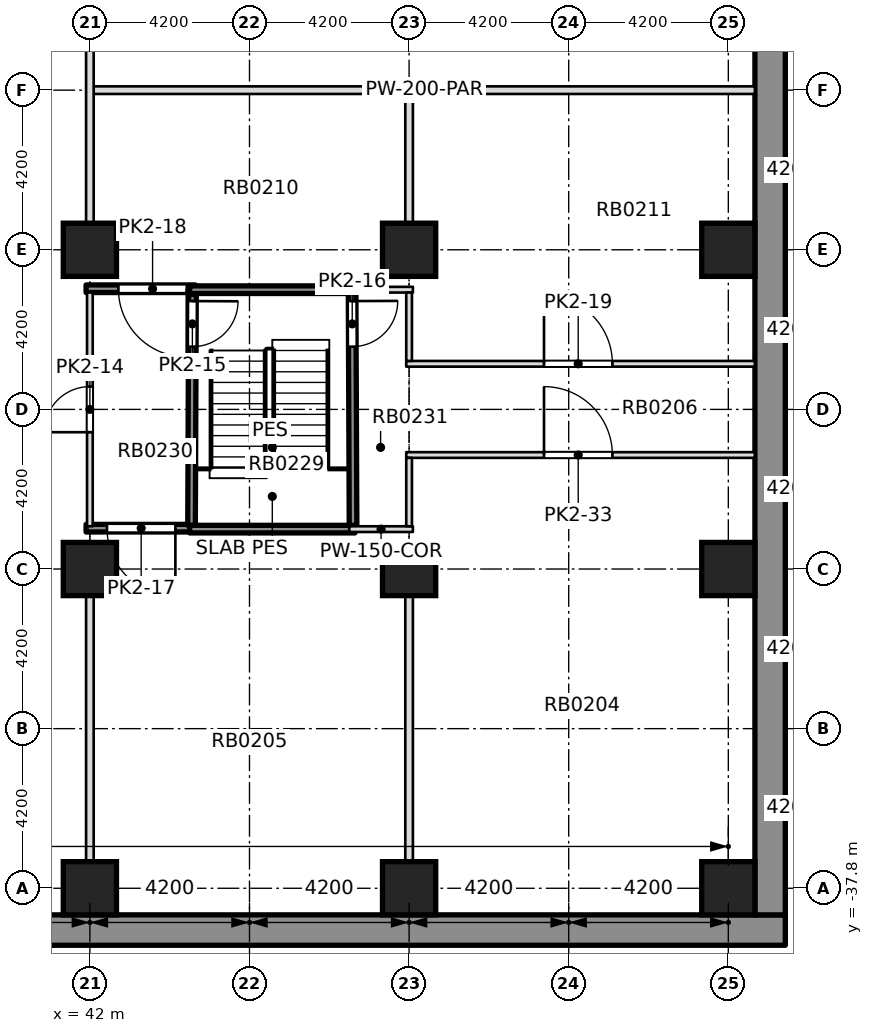
"""IFC4 building model, lengths in metres.
Left out: names, types, materials, properties, quantities, classifications, styles, units other than length and angle.
Written with IfcOpenShell. Run it as: python <this file> out.ifc"""

import sys

from ifc_helpers import new_model, si_unit, direction, frame, frame_2d, origin, origin_2d, place, context, subcontext, project, spatial, rectangle, extrude, element, fill, save


model = new_model("IFC4")
c1 = context("Model", 3, precision=1e-05, world=origin(), true_north=direction((0.0, 1.0)))
c2 = subcontext(c1, "Body", "Model", "MODEL_VIEW")
j1 = project(units=[si_unit("LENGTHUNIT", "METRE"), si_unit("PLANEANGLEUNIT", "RADIAN")], contexts=[c1])
p1 = place(None, origin())
s1 = spatial("IfcSite", under=j1, at=p1, CompositionType="ELEMENT")
p2 = place(p1, origin())
s2 = spatial("IfcBuilding", under=s1, at=p2, CompositionType="ELEMENT")
p3 = place(p2, frame((0.0, 0.0, -8.4)))
s3 = spatial("IfcBuildingStorey", under=s2, at=p3, CompositionType="ELEMENT", Elevation=-8.4)
p4 = place(p3, frame((-43.5, -38.9, -0.5), z_axis=(0.0, 0.0, 1.0), x_axis=(1.0, 0.0, 0.0)))
e1 = element("IfcWall", 1, at=p4, inside=s3, PredefinedType="SOLIDWALL", context=c2, shape_type="SweptSolid", body=[
    extrude(rectangle(XDim=103.8, YDim=0.8, at=frame_2d((51.9, 0.0))), origin(), (0.0, 0.0, 1.0), 4.7),
])
p5 = place(p3, frame((59.9, -38.5, -0.5), z_axis=(0.0, 0.0, 1.0), x_axis=(0.0, 1.0, 0.0)))
e2 = element("IfcWall", 2, at=p5, inside=s3, PredefinedType="SOLIDWALL", context=c2, shape_type="SweptSolid", body=[
    extrude(rectangle(XDim=77.0, YDim=0.8, at=frame_2d((38.5, 0.0))), origin(), (0.0, 0.0, 1.0), 4.7),
])
for number, where, z_axis, x_axis in (
    (3, (42.0, -37.8, -0.5), (0.0, 0.0, 1.0), (1.0, 0.0, 0.0)),
    (4, (50.4, -37.8, -0.5), (0.0, 0.0, 1.0), (1.0, 0.0, 0.0)),
    (5, (58.8, -37.8, -0.5), (0.0, 0.0, 1.0), (1.0, 0.0, 0.0)),
    (6, (42.0, -29.4, -0.5), (0.0, 0.0, 1.0), (1.0, 0.0, 0.0)),
    (7, (50.4, -29.4, -0.5), (0.0, 0.0, 1.0), (1.0, 0.0, 0.0)),
    (8, (58.8, -29.4, -0.5), (0.0, 0.0, 1.0), (1.0, 0.0, 0.0)),
    (9, (42.0, -21.0, -0.5), (0.0, 0.0, 1.0), (1.0, 0.0, 0.0)),
    (10, (50.4, -21.0, -0.5), (0.0, 0.0, 1.0), (1.0, 0.0, 0.0)),
    (11, (58.8, -21.0, -0.5), (0.0, 0.0, 1.0), (1.0, 0.0, 0.0)),
):
    element("IfcColumn", number, at=place(p3, frame(where, z_axis=z_axis, x_axis=x_axis)), inside=s3, PredefinedType="COLUMN", context=c2, shape_type="SweptSolid", body=[
        extrude(rectangle(XDim=1.4, YDim=1.4, at=origin_2d()), origin(), (0.0, 0.0, 1.0), 4.7),
    ])
p6 = place(p3, frame((41.9, -28.325, 0.0), z_axis=(0.0, 0.0, 1.0), x_axis=(1.0, 0.0, 0.0)))
e12 = element("IfcWall", 12, at=p6, inside=s3, PredefinedType="SOLIDWALL", context=c2, shape_type="SweptSolid", body=[
    extrude(rectangle(XDim=2.875, YDim=0.2, at=frame_2d((1.438, 0.0))), origin(), (0.0, 0.0, 1.0), 3.85),
])
p7 = place(p6, frame((0.55, 0.0, 0.0)))
e13 = element("IfcOpeningElement", 13, at=p7, cuts=e12, PredefinedType="OPENING", context=c2, shape_type="SweptSolid", body=[
    extrude(rectangle(XDim=1.8, YDim=2.1, at=frame_2d((0.9, 1.05))), frame((0.0, 0.11, 0.0), z_axis=(0.0, -1.0, 0.0), x_axis=(1.0, 0.0, 0.0)), (0.0, 0.0, 1.0), 0.22),
])
p8 = place(p3, frame((44.625, -28.35, 0.0), z_axis=(0.0, 0.0, 1.0), x_axis=(1.0, 0.0, 0.0)))
e14 = element("IfcWall", 14, at=p8, inside=s3, PredefinedType="SOLIDWALL", context=c2, shape_type="SweptSolid", body=[
    extrude(rectangle(XDim=4.35, YDim=0.2, at=frame_2d((2.175, 0.0))), origin(), (0.0, 0.0, 1.0), 3.85),
])
p9 = place(p3, frame((48.825, -28.35, 0.0), z_axis=(0.0, 0.0, 1.0), x_axis=(1.0, 0.0, 0.0)))
e15 = element("IfcWall", 15, at=p9, inside=s3, PredefinedType="PARTITIONING", context=c2, shape_type="SweptSolid", body=[
    extrude(rectangle(XDim=1.675, YDim=0.15, at=frame_2d((0.837, 0.0))), origin(), (0.0, 0.0, 1.0), 3.85),
])
p10 = place(p3, frame((50.325, -26.4, 0.0), z_axis=(0.0, 0.0, 1.0), x_axis=(1.0, 0.0, 0.0)))
e16 = element("IfcWall", 16, at=p10, inside=s3, PredefinedType="PARTITIONING", context=c2, shape_type="SweptSolid", body=[
    extrude(rectangle(XDim=9.174, YDim=0.15, at=frame_2d((4.587, 0.0))), origin(), (0.0, 0.0, 1.0), 3.85),
])
p11 = place(p10, frame((3.625, 0.0, 0.0)))
e17 = element("IfcOpeningElement", 17, at=p11, cuts=e16, PredefinedType="OPENING", context=c2, shape_type="SweptSolid", body=[
    extrude(rectangle(XDim=1.8, YDim=2.1, at=frame_2d((0.9, 1.05))), frame((0.0, 0.085, 0.0), z_axis=(0.0, -1.0, 0.0), x_axis=(1.0, 0.0, 0.0)), (0.0, 0.0, 1.0), 0.17),
])
p12 = place(p3, frame((50.325, -24.0, 0.0), z_axis=(0.0, 0.0, 1.0), x_axis=(1.0, 0.0, 0.0)))
e18 = element("IfcWall", 18, at=p12, inside=s3, PredefinedType="PARTITIONING", context=c2, shape_type="SweptSolid", body=[
    extrude(rectangle(XDim=9.174, YDim=0.15, at=frame_2d((4.587, 0.0))), origin(), (0.0, 0.0, 1.0), 3.85),
])
p13 = place(p12, frame((3.625, 0.0, 0.0)))
e19 = element("IfcOpeningElement", 19, at=p13, cuts=e18, PredefinedType="OPENING", context=c2, shape_type="SweptSolid", body=[
    extrude(rectangle(XDim=1.8, YDim=2.1, at=frame_2d((0.9, 1.05))), frame((0.0, 0.085, 0.0), z_axis=(0.0, -1.0, 0.0), x_axis=(1.0, 0.0, 0.0)), (0.0, 0.0, 1.0), 0.17),
])
p14 = place(p3, frame((41.9, -22.025, 0.0), z_axis=(0.0, 0.0, 1.0), x_axis=(1.0, 0.0, 0.0)))
e20 = element("IfcWall", 20, at=p14, inside=s3, PredefinedType="SOLIDWALL", context=c2, shape_type="SweptSolid", body=[
    extrude(rectangle(XDim=2.875, YDim=0.2, at=frame_2d((1.438, 0.0))), origin(), (0.0, 0.0, 1.0), 3.85),
])
p15 = place(p14, frame((0.85, 0.0, 0.0)))
e21 = element("IfcOpeningElement", 21, at=p15, cuts=e20, PredefinedType="OPENING", context=c2, shape_type="SweptSolid", body=[
    extrude(rectangle(XDim=1.8, YDim=2.1, at=frame_2d((0.9, 1.05))), frame((0.0, 0.11, 0.0), z_axis=(0.0, -1.0, 0.0), x_axis=(1.0, 0.0, 0.0)), (0.0, 0.0, 1.0), 0.22),
])
p16 = place(p3, frame((44.625, -22.05, 0.0), z_axis=(0.0, 0.0, 1.0), x_axis=(1.0, 0.0, 0.0)))
e22 = element("IfcWall", 22, at=p16, inside=s3, PredefinedType="SOLIDWALL", context=c2, shape_type="SweptSolid", body=[
    extrude(rectangle(XDim=4.35, YDim=0.2, at=frame_2d((2.175, 0.0))), origin(), (0.0, 0.0, 1.0), 3.85),
])
p17 = place(p3, frame((48.825, -22.05, 0.0), z_axis=(0.0, 0.0, 1.0), x_axis=(1.0, 0.0, 0.0)))
e23 = element("IfcWall", 23, at=p17, inside=s3, PredefinedType="PARTITIONING", context=c2, shape_type="SweptSolid", body=[
    extrude(rectangle(XDim=1.675, YDim=0.15, at=frame_2d((0.837, 0.0))), origin(), (0.0, 0.0, 1.0), 3.85),
])
p18 = place(p3, frame((42.1, -16.8, 0.0), z_axis=(0.0, 0.0, 1.0), x_axis=(1.0, 0.0, 0.0)))
e24 = element("IfcWall", 24, at=p18, inside=s3, PredefinedType="PARTITIONING", context=c2, shape_type="SweptSolid", body=[
    extrude(rectangle(XDim=17.399, YDim=0.2, at=frame_2d((8.699, 0.0))), origin(), (0.0, 0.0, 1.0), 3.85),
])
p19 = place(p3, frame((42.0, -37.1, 0.0), z_axis=(0.0, 0.0, 1.0), x_axis=(0.0, 1.0, 0.0)))
e25 = element("IfcWall", 25, at=p19, inside=s3, PredefinedType="PARTITIONING", context=c2, shape_type="SweptSolid", body=[
    extrude(rectangle(XDim=7.0, YDim=0.2, at=frame_2d((3.5, 0.0))), origin(), (0.0, 0.0, 1.0), 3.85),
])
p20 = place(p3, frame((42.0, -28.275, 0.0), z_axis=(0.0, 0.0, 1.0), x_axis=(0.0, 1.0, 0.0)))
e26 = element("IfcWall", 26, at=p20, inside=s3, PredefinedType="PARTITIONING", context=c2, shape_type="SweptSolid", body=[
    extrude(rectangle(XDim=6.15, YDim=0.15, at=frame_2d((3.075, 0.0))), origin(), (0.0, 0.0, 1.0), 3.85),
])
p21 = place(p20, frame((2.475, 0.0, 0.0)))
e27 = element("IfcOpeningElement", 27, at=p21, cuts=e26, PredefinedType="OPENING", context=c2, shape_type="SweptSolid", body=[
    extrude(rectangle(XDim=1.2, YDim=2.1, at=frame_2d((0.6, 1.05))), frame((0.0, 0.085, 0.0), z_axis=(0.0, -1.0, 0.0), x_axis=(1.0, 0.0, 0.0)), (0.0, 0.0, 1.0), 0.17),
])
p22 = place(p3, frame((42.0, -20.3, 0.0), z_axis=(0.0, 0.0, 1.0), x_axis=(0.0, 1.0, 0.0)))
e28 = element("IfcWall", 28, at=p22, inside=s3, PredefinedType="PARTITIONING", context=c2, shape_type="SweptSolid", body=[
    extrude(rectangle(XDim=7.0, YDim=0.2, at=frame_2d((3.5, 0.0))), origin(), (0.0, 0.0, 1.0), 3.85),
])
p23 = place(p3, frame((44.675, -28.25, 0.0), z_axis=(0.0, 0.0, 1.0), x_axis=(0.004098985015, 0.999991599126, 0.0)))
e29 = element("IfcWall", 29, at=p23, inside=s3, PredefinedType="SOLIDWALL", context=c2, shape_type="SweptSolid", body=[
    extrude(rectangle(XDim=6.075, YDim=0.2, at=frame_2d((3.038, 0.0))), origin(), (0.0, 0.0, 1.0), 3.85),
])
p24 = place(p23, frame((4.7, 0.0, 0.0)))
e30 = element("IfcOpeningElement", 30, at=p24, cuts=e29, PredefinedType="OPENING", context=c2, shape_type="SweptSolid", body=[
    extrude(rectangle(XDim=1.2, YDim=2.1, at=frame_2d((0.6, 1.05))), frame((0.0, 0.11, 0.0), z_axis=(0.0, -1.0, 0.0), x_axis=(1.0, 0.0, 0.0)), (0.0, 0.0, 1.0), 0.22),
])
p25 = place(p3, frame((48.925, -28.25, 0.0), z_axis=(0.0, 0.0, 1.0), x_axis=(-0.004065655173, 0.99999173519, 0.0)))
e31 = element("IfcWall", 31, at=p25, inside=s3, PredefinedType="SOLIDWALL", context=c2, shape_type="SweptSolid", body=[
    extrude(rectangle(XDim=6.125, YDim=0.2, at=frame_2d((3.062, 0.0))), origin(), (0.0, 0.0, 1.0), 3.85),
])
p26 = place(p25, frame((4.7, 0.0, 0.0)))
e32 = element("IfcOpeningElement", 32, at=p26, cuts=e31, PredefinedType="OPENING", context=c2, shape_type="SweptSolid", body=[
    extrude(rectangle(XDim=1.2, YDim=2.1, at=frame_2d((0.6, 1.05))), frame((0.0, 0.11, 0.0), z_axis=(0.0, -1.0, 0.0), x_axis=(1.0, 0.0, 0.0)), (0.0, 0.0, 1.0), 0.22),
])
p27 = place(p3, frame((50.4, -37.1, 0.0), z_axis=(0.0, 0.0, 1.0), x_axis=(0.0, 1.0, 0.0)))
e33 = element("IfcWall", 33, at=p27, inside=s3, PredefinedType="PARTITIONING", context=c2, shape_type="SweptSolid", body=[
    extrude(rectangle(XDim=7.0, YDim=0.2, at=frame_2d((3.5, 0.0))), origin(), (0.0, 0.0, 1.0), 3.85),
])
p28 = place(p3, frame((50.4, -28.275, 0.0), z_axis=(0.0, 0.0, 1.0), x_axis=(0.0, 1.0, 0.0)))
e34 = element("IfcWall", 34, at=p28, inside=s3, PredefinedType="PARTITIONING", context=c2, shape_type="SweptSolid", body=[
    extrude(rectangle(XDim=1.8, YDim=0.15, at=frame_2d((0.9, 0.0))), origin(), (0.0, 0.0, 1.0), 3.85),
])
p29 = place(p3, frame((50.4, -23.925, 0.0), z_axis=(0.0, 0.0, 1.0), x_axis=(0.0, 1.0, 0.0)))
e35 = element("IfcWall", 35, at=p29, inside=s3, PredefinedType="PARTITIONING", context=c2, shape_type="SweptSolid", body=[
    extrude(rectangle(XDim=1.8, YDim=0.15, at=frame_2d((0.9, 0.0))), origin(), (0.0, 0.0, 1.0), 3.85),
])
p30 = place(p3, frame((50.4, -20.3, 0.0), z_axis=(0.0, 0.0, 1.0), x_axis=(0.0, 1.0, 0.0)))
e36 = element("IfcWall", 36, at=p30, inside=s3, PredefinedType="PARTITIONING", context=c2, shape_type="SweptSolid", body=[
    extrude(rectangle(XDim=3.4, YDim=0.2, at=frame_2d((1.7, 0.0))), origin(), (0.0, 0.0, 1.0), 3.85),
])
p31 = place(p21, origin())
e37 = element("IfcDoor", 37, at=p31, inside=s3, OperationType="DOUBLE_DOOR_SINGLE_SWING", PredefinedType="DOOR", context=c2, shape_type="SweptSolid", body=[
    extrude(rectangle(XDim=1.2, YDim=2.1, at=frame_2d((0.6, 1.05))), frame((0.0, 0.025, 0.0), z_axis=(0.0, -1.0, 0.0), x_axis=(1.0, 0.0, 0.0)), (0.0, 0.0, 1.0), 0.05),
])
fill(e27, e37)
p32 = place(p24, origin())
e38 = element("IfcDoor", 38, at=p32, inside=s3, OperationType="DOUBLE_DOOR_SINGLE_SWING", PredefinedType="DOOR", context=c2, shape_type="SweptSolid", body=[
    extrude(rectangle(XDim=1.2, YDim=2.1, at=frame_2d((0.6, 1.05))), frame((0.0, 0.025, 0.0), z_axis=(0.0, -1.0, 0.0), x_axis=(1.0, 0.0, 0.0)), (0.0, 0.0, 1.0), 0.05),
])
fill(e30, e38)
p33 = place(p26, origin())
e39 = element("IfcDoor", 39, at=p33, inside=s3, OperationType="DOUBLE_DOOR_SINGLE_SWING", PredefinedType="DOOR", context=c2, shape_type="SweptSolid", body=[
    extrude(rectangle(XDim=1.2, YDim=2.1, at=frame_2d((0.6, 1.05))), frame((0.0, 0.025, 0.0), z_axis=(0.0, -1.0, 0.0), x_axis=(1.0, 0.0, 0.0)), (0.0, 0.0, 1.0), 0.05),
])
fill(e32, e39)
p34 = place(p7, origin())
e40 = element("IfcDoor", 40, at=p34, inside=s3, OperationType="DOUBLE_DOOR_SINGLE_SWING", PredefinedType="DOOR", context=c2, shape_type="SweptSolid", body=[
    extrude(rectangle(XDim=1.8, YDim=2.1, at=frame_2d((0.9, 1.05))), frame((0.0, 0.025, 0.0), z_axis=(0.0, -1.0, 0.0), x_axis=(1.0, 0.0, 0.0)), (0.0, 0.0, 1.0), 0.05),
])
fill(e13, e40)
p35 = place(p15, origin())
e41 = element("IfcDoor", 41, at=p35, inside=s3, OperationType="DOUBLE_DOOR_SINGLE_SWING", PredefinedType="DOOR", context=c2, shape_type="SweptSolid", body=[
    extrude(rectangle(XDim=1.8, YDim=2.1, at=frame_2d((0.9, 1.05))), frame((0.0, 0.025, 0.0), z_axis=(0.0, -1.0, 0.0), x_axis=(1.0, 0.0, 0.0)), (0.0, 0.0, 1.0), 0.05),
])
fill(e21, e41)
p36 = place(p13, origin())
e42 = element("IfcDoor", 42, at=p36, inside=s3, OperationType="DOUBLE_DOOR_SINGLE_SWING", PredefinedType="DOOR", context=c2, shape_type="SweptSolid", body=[
    extrude(rectangle(XDim=1.8, YDim=2.1, at=frame_2d((0.9, 1.05))), frame((0.0, 0.025, 0.0), z_axis=(0.0, -1.0, 0.0), x_axis=(1.0, 0.0, 0.0)), (0.0, 0.0, 1.0), 0.05),
])
fill(e19, e42)
p37 = place(p11, origin())
e43 = element("IfcDoor", 43, at=p37, inside=s3, OperationType="DOUBLE_DOOR_SINGLE_SWING", PredefinedType="DOOR", context=c2, shape_type="SweptSolid", body=[
    extrude(rectangle(XDim=1.8, YDim=2.1, at=frame_2d((0.9, 1.05))), frame((0.0, 0.025, 0.0), z_axis=(0.0, -1.0, 0.0), x_axis=(1.0, 0.0, 0.0)), (0.0, 0.0, 1.0), 0.05),
])
fill(e17, e43)
save(model, sys.argv[1])
